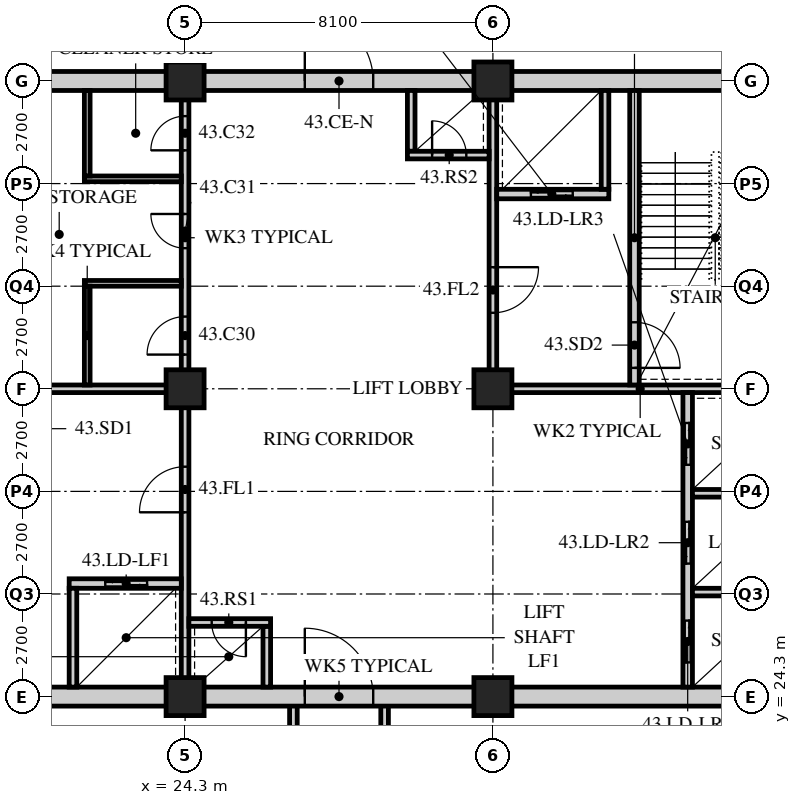
"""IFC4 building model, lengths in metres.
Left out: names, types, materials, properties, quantities, classifications, styles, units other than length and angle.
Written with IfcOpenShell. Run it as: python <this file> out.ifc"""

import sys

from ifc_helpers import new_model, si_unit, direction, frame, frame_2d, origin, origin_2d, place, context, subcontext, project, spatial, rectangle, hollow_rectangle, extrude, element, fill, save


model = new_model("IFC4")
c1 = context("Model", 3, precision=1e-05, world=origin(), true_north=direction((0.0, 1.0)))
c2 = subcontext(c1, "Body", "Model", "MODEL_VIEW")
j1 = project(units=[si_unit("LENGTHUNIT", "METRE"), si_unit("PLANEANGLEUNIT", "RADIAN")], contexts=[c1])
p1 = place(None, origin())
s1 = spatial("IfcSite", under=j1, at=p1, CompositionType="ELEMENT")
p2 = place(p1, origin())
s2 = spatial("IfcBuilding", under=s1, at=p2, CompositionType="ELEMENT")
p3 = place(p2, frame((0.0, 0.0, 170.4)))
s3 = spatial("IfcBuildingStorey", under=s2, at=p3, CompositionType="ELEMENT", Elevation=170.4)
for number, where, z_axis, x_axis in (
    (1, (24.3, 24.3, 0.0), (0.0, 0.0, 1.0), (1.0, 0.0, 0.0)),
    (2, (24.3, 32.4, 0.0), (0.0, 0.0, 1.0), (1.0, 0.0, 0.0)),
    (3, (24.3, 40.5, 0.0), (0.0, 0.0, 1.0), (1.0, 0.0, 0.0)),
    (4, (32.4, 24.3, 0.0), (0.0, 0.0, 1.0), (1.0, 0.0, 0.0)),
    (5, (32.4, 32.4, 0.0), (0.0, 0.0, 1.0), (1.0, 0.0, 0.0)),
    (6, (32.4, 40.5, 0.0), (0.0, 0.0, 1.0), (1.0, 0.0, 0.0)),
):
    element("IfcColumn", number, at=place(p3, frame(where, z_axis=z_axis, x_axis=x_axis)), inside=s3, PredefinedType="COLUMN", context=c2, shape_type="SweptSolid", body=[
        extrude(hollow_rectangle(XDim=1.0, YDim=1.0, WallThickness=0.1, at=origin_2d()), origin(), (0.0, 0.0, 1.0), 3.6),
    ])
for number, where, z_axis, x_axis in (
    (7, (27.15, 20.7, 0.0), (0.0, 0.0, 1.0), (0.0, 1.0, 0.0)),
    (8, (29.55, 20.7, 0.0), (0.0, 0.0, 1.0), (0.0, 1.0, 0.0)),
):
    element("IfcWall", number, at=place(p3, frame(where, z_axis=z_axis, x_axis=x_axis)), inside=s3, PredefinedType="SOLIDWALL", context=c2, shape_type="SweptSolid", body=[
        extrude(rectangle(XDim=3.6, YDim=0.2, at=frame_2d((1.8, 0.0))), origin(), (0.0, 0.0, 1.0), 3.39),
    ])
p4 = place(p3, frame((15.95, 24.3, 0.0), z_axis=(0.0, 0.0, 1.0), x_axis=(1.0, 0.0, 0.0)))
e9 = element("IfcWall", 9, at=p4, inside=s3, PredefinedType="SOLIDWALL", context=c2, shape_type="SweptSolid", body=[
    extrude(rectangle(XDim=24.8, YDim=0.5, at=frame_2d((12.4, 0.0))), origin(), (0.0, 0.0, 1.0), 2.74),
])
p5 = place(p4, frame((11.5, 0.0, 0.0)))
e10 = element("IfcOpeningElement", 10, at=p5, cuts=e9, PredefinedType="OPENING", context=c2, shape_type="SweptSolid", body=[
    extrude(rectangle(XDim=1.8, YDim=2.4, at=frame_2d((0.9, 1.2))), frame((0.0, 0.26, 0.0), z_axis=(0.0, -1.0, 0.0), x_axis=(1.0, 0.0, 0.0)), (0.0, 0.0, 1.0), 0.52),
])
p6 = place(p3, frame((15.95, 40.5, 0.0), z_axis=(0.0, 0.0, 1.0), x_axis=(1.0, 0.0, 0.0)))
e11 = element("IfcWall", 11, at=p6, inside=s3, PredefinedType="SOLIDWALL", context=c2, shape_type="SweptSolid", body=[
    extrude(rectangle(XDim=24.8, YDim=0.5, at=frame_2d((12.4, 0.0))), origin(), (0.0, 0.0, 1.0), 2.74),
])
p7 = place(p6, frame((11.5, 0.0, 0.0)))
e12 = element("IfcOpeningElement", 12, at=p7, cuts=e11, PredefinedType="OPENING", context=c2, shape_type="SweptSolid", body=[
    extrude(rectangle(XDim=1.8, YDim=2.4, at=frame_2d((0.9, 1.2))), frame((0.0, 0.26, 0.0), z_axis=(0.0, -1.0, 0.0), x_axis=(1.0, 0.0, 0.0)), (0.0, 0.0, 1.0), 0.52),
])
p8 = place(p3, frame((16.45, 32.4, 0.0), z_axis=(0.0, 0.0, 1.0), x_axis=(1.0, 0.0, 0.0)))
e13 = element("IfcWall", 13, at=p8, inside=s3, PredefinedType="SOLIDWALL", context=c2, shape_type="SweptSolid", body=[
    extrude(rectangle(XDim=7.95, YDim=0.2, at=frame_2d((3.975, 0.0))), origin(), (0.0, 0.0, 1.0), 2.778),
])
p9 = place(p3, frame((24.3, 24.55, 0.0), z_axis=(0.0, 0.0, 1.0), x_axis=(0.0, 1.0, 0.0)))
e14 = element("IfcWall", 14, at=p9, inside=s3, PredefinedType="SOLIDWALL", context=c2, shape_type="SweptSolid", body=[
    extrude(rectangle(XDim=7.75, YDim=0.2, at=frame_2d((3.875, 0.0))), origin(), (0.0, 0.0, 1.0), 2.778),
])
p10 = place(p9, frame((4.6, 0.0, 0.0)))
e15 = element("IfcOpeningElement", 15, at=p10, cuts=e14, PredefinedType="OPENING", context=c2, shape_type="SweptSolid", body=[
    extrude(rectangle(XDim=1.2, YDim=2.1, at=frame_2d((0.6, 1.05))), frame((0.0, 0.11, 0.0), z_axis=(0.0, -1.0, 0.0), x_axis=(1.0, 0.0, 0.0)), (0.0, 0.0, 1.0), 0.22),
])
p11 = place(p3, frame((21.25, 27.275, 0.0), z_axis=(0.0, 0.0, 1.0), x_axis=(1.0, 0.0, 0.0)))
e16 = element("IfcWall", 16, at=p11, inside=s3, PredefinedType="SOLIDWALL", context=c2, shape_type="SweptSolid", body=[
    extrude(rectangle(XDim=2.95, YDim=0.25, at=frame_2d((1.475, 0.0))), origin(), (0.0, 0.0, 1.0), 3.39),
])
p12 = place(p11, frame((0.95, 0.0, 0.0)))
e17 = element("IfcOpeningElement", 17, at=p12, cuts=e16, PredefinedType="OPENING", context=c2, shape_type="SweptSolid", body=[
    extrude(rectangle(XDim=1.1, YDim=2.4, at=frame_2d((0.55, 1.2))), frame((0.0, 0.135, 0.0), z_axis=(0.0, -1.0, 0.0), x_axis=(1.0, 0.0, 0.0)), (0.0, 0.0, 1.0), 0.27),
])
p13 = place(p3, frame((21.35, 24.55, 0.0), z_axis=(0.0, 0.0, 1.0), x_axis=(0.0, 1.0, 0.0)))
e18 = element("IfcWall", 18, at=p13, inside=s3, PredefinedType="SOLIDWALL", context=c2, shape_type="SweptSolid", body=[
    extrude(rectangle(XDim=2.6, YDim=0.2, at=frame_2d((1.3, 0.0))), origin(), (0.0, 0.0, 1.0), 3.39),
])
p14 = place(p3, frame((26.45, 24.55, 0.0), z_axis=(0.0, 0.0, 1.0), x_axis=(0.0, 1.0, 0.0)))
e19 = element("IfcWall", 19, at=p14, inside=s3, PredefinedType="SOLIDWALL", context=c2, shape_type="SweptSolid", body=[
    extrude(rectangle(XDim=1.6, YDim=0.2, at=frame_2d((0.8, 0.0))), origin(), (0.0, 0.0, 1.0), 3.39),
])
p15 = place(p3, frame((24.4, 26.25, 0.0), z_axis=(0.0, 0.0, 1.0), x_axis=(1.0, 0.0, 0.0)))
e20 = element("IfcWall", 20, at=p15, inside=s3, PredefinedType="SOLIDWALL", context=c2, shape_type="SweptSolid", body=[
    extrude(rectangle(XDim=2.15, YDim=0.2, at=frame_2d((1.075, 0.0))), origin(), (0.0, 0.0, 1.0), 3.39),
])
p16 = place(p15, frame((0.6, 0.0, 0.0)))
e21 = element("IfcOpeningElement", 21, at=p16, cuts=e20, PredefinedType="OPENING", context=c2, shape_type="SweptSolid", body=[
    extrude(rectangle(XDim=0.9, YDim=2.1, at=frame_2d((0.45, 1.05))), frame((0.0, 0.11, 0.0), z_axis=(0.0, -1.0, 0.0), x_axis=(1.0, 0.0, 0.0)), (0.0, 0.0, 1.0), 0.22),
])
p17 = place(p3, frame((32.3, 32.4, 0.0), z_axis=(0.0, 0.0, 1.0), x_axis=(1.0, 0.0, 0.0)))
e22 = element("IfcWall", 22, at=p17, inside=s3, PredefinedType="SOLIDWALL", context=c2, shape_type="SweptSolid", body=[
    extrude(rectangle(XDim=7.95, YDim=0.2, at=frame_2d((3.975, 0.0))), origin(), (0.0, 0.0, 1.0), 2.778),
])
p18 = place(p3, frame((32.4, 32.5, 0.0), z_axis=(0.0, 0.0, 1.0), x_axis=(0.0, 1.0, 0.0)))
e23 = element("IfcWall", 23, at=p18, inside=s3, PredefinedType="SOLIDWALL", context=c2, shape_type="SweptSolid", body=[
    extrude(rectangle(XDim=7.75, YDim=0.2, at=frame_2d((3.875, 0.0))), origin(), (0.0, 0.0, 1.0), 2.778),
])
p19 = place(p18, frame((1.9, 0.0, 0.0)))
e24 = element("IfcOpeningElement", 24, at=p19, cuts=e23, PredefinedType="OPENING", context=c2, shape_type="SweptSolid", body=[
    extrude(rectangle(XDim=1.2, YDim=2.1, at=frame_2d((0.6, 1.05))), frame((0.0, 0.11, 0.0), z_axis=(0.0, -1.0, 0.0), x_axis=(1.0, 0.0, 0.0)), (0.0, 0.0, 1.0), 0.22),
])
p20 = place(p3, frame((37.525, 24.55, 0.0), z_axis=(0.0, 0.0, 1.0), x_axis=(0.0, 1.0, 0.0)))
e25 = element("IfcWall", 25, at=p20, inside=s3, PredefinedType="SOLIDWALL", context=c2, shape_type="SweptSolid", body=[
    extrude(rectangle(XDim=7.75, YDim=0.25, at=frame_2d((3.875, 0.0))), origin(), (0.0, 0.0, 1.0), 3.39),
])
p21 = place(p20, frame((0.65, 0.0, 0.0)))
e26 = element("IfcOpeningElement", 26, at=p21, cuts=e25, PredefinedType="OPENING", context=c2, shape_type="SweptSolid", body=[
    extrude(rectangle(XDim=1.1, YDim=2.4, at=frame_2d((0.55, 1.2))), frame((0.0, 0.135, 0.0), z_axis=(0.0, -1.0, 0.0), x_axis=(1.0, 0.0, 0.0)), (0.0, 0.0, 1.0), 0.27),
])
p22 = place(p20, frame((3.25, 0.0, 0.0)))
e27 = element("IfcOpeningElement", 27, at=p22, cuts=e25, PredefinedType="OPENING", context=c2, shape_type="SweptSolid", body=[
    extrude(rectangle(XDim=1.1, YDim=2.4, at=frame_2d((0.55, 1.2))), frame((0.0, 0.135, 0.0), z_axis=(0.0, -1.0, 0.0), x_axis=(1.0, 0.0, 0.0)), (0.0, 0.0, 1.0), 0.27),
])
p23 = place(p20, frame((5.85, 0.0, 0.0)))
e28 = element("IfcOpeningElement", 28, at=p23, cuts=e25, PredefinedType="OPENING", context=c2, shape_type="SweptSolid", body=[
    extrude(rectangle(XDim=1.1, YDim=2.4, at=frame_2d((0.55, 1.2))), frame((0.0, 0.135, 0.0), z_axis=(0.0, -1.0, 0.0), x_axis=(1.0, 0.0, 0.0)), (0.0, 0.0, 1.0), 0.27),
])
for number, where, z_axis, x_axis in (
    (29, (37.65, 27.05, 0.0), (0.0, 0.0, 1.0), (1.0, 0.0, 0.0)),
    (30, (37.65, 29.65, 0.0), (0.0, 0.0, 1.0), (1.0, 0.0, 0.0)),
):
    element("IfcWall", number, at=place(p3, frame(where, z_axis=z_axis, x_axis=x_axis)), inside=s3, PredefinedType="SOLIDWALL", context=c2, shape_type="SweptSolid", body=[
        extrude(rectangle(XDim=2.6, YDim=0.2, at=frame_2d((1.3, 0.0))), origin(), (0.0, 0.0, 1.0), 3.39),
    ])
p24 = place(p3, frame((36.125, 32.5, 0.0), z_axis=(0.0, 0.0, 1.0), x_axis=(0.0, 1.0, 0.0)))
e31 = element("IfcWall", 31, at=p24, inside=s3, PredefinedType="SOLIDWALL", context=c2, shape_type="SweptSolid", body=[
    extrude(rectangle(XDim=7.75, YDim=0.25, at=frame_2d((3.875, 0.0))), origin(), (0.0, 0.0, 1.0), 3.39),
])
p25 = place(p24, frame((0.45, 0.0, 0.0)))
e32 = element("IfcOpeningElement", 32, at=p25, cuts=e31, PredefinedType="OPENING", context=c2, shape_type="SweptSolid", body=[
    extrude(rectangle(XDim=1.2, YDim=2.1, at=frame_2d((0.6, 1.05))), frame((0.0, 0.135, 0.0), z_axis=(0.0, -1.0, 0.0), x_axis=(1.0, 0.0, 0.0)), (0.0, 0.0, 1.0), 0.27),
])
p26 = place(p3, frame((32.5, 37.525, 0.0), z_axis=(0.0, 0.0, 1.0), x_axis=(1.0, 0.0, 0.0)))
e33 = element("IfcWall", 33, at=p26, inside=s3, PredefinedType="SOLIDWALL", context=c2, shape_type="SweptSolid", body=[
    extrude(rectangle(XDim=2.95, YDim=0.25, at=frame_2d((1.475, 0.0))), origin(), (0.0, 0.0, 1.0), 3.39),
])
p27 = place(p26, frame((0.9, 0.0, 0.0)))
e34 = element("IfcOpeningElement", 34, at=p27, cuts=e33, PredefinedType="OPENING", context=c2, shape_type="SweptSolid", body=[
    extrude(rectangle(XDim=1.1, YDim=2.4, at=frame_2d((0.55, 1.2))), frame((0.0, 0.135, 0.0), z_axis=(0.0, -1.0, 0.0), x_axis=(1.0, 0.0, 0.0)), (0.0, 0.0, 1.0), 0.27),
])
p28 = place(p3, frame((35.35, 37.65, 0.0), z_axis=(0.0, 0.0, 1.0), x_axis=(0.0, 1.0, 0.0)))
e35 = element("IfcWall", 35, at=p28, inside=s3, PredefinedType="SOLIDWALL", context=c2, shape_type="SweptSolid", body=[
    extrude(rectangle(XDim=2.6, YDim=0.2, at=frame_2d((1.3, 0.0))), origin(), (0.0, 0.0, 1.0), 3.39),
])
p29 = place(p3, frame((30.25, 38.65, 0.0), z_axis=(0.0, 0.0, 1.0), x_axis=(0.0, 1.0, 0.0)))
e36 = element("IfcWall", 36, at=p29, inside=s3, PredefinedType="SOLIDWALL", context=c2, shape_type="SweptSolid", body=[
    extrude(rectangle(XDim=1.6, YDim=0.2, at=frame_2d((0.8, 0.0))), origin(), (0.0, 0.0, 1.0), 3.39),
])
p30 = place(p3, frame((30.15, 38.55, 0.0), z_axis=(0.0, 0.0, 1.0), x_axis=(1.0, 0.0, 0.0)))
e37 = element("IfcWall", 37, at=p30, inside=s3, PredefinedType="SOLIDWALL", context=c2, shape_type="SweptSolid", body=[
    extrude(rectangle(XDim=2.15, YDim=0.2, at=frame_2d((1.075, 0.0))), origin(), (0.0, 0.0, 1.0), 3.39),
])
p31 = place(p30, frame((0.65, 0.0, 0.0)))
e38 = element("IfcOpeningElement", 38, at=p31, cuts=e37, PredefinedType="OPENING", context=c2, shape_type="SweptSolid", body=[
    extrude(rectangle(XDim=0.9, YDim=2.1, at=frame_2d((0.45, 1.05))), frame((0.0, 0.11, 0.0), z_axis=(0.0, -1.0, 0.0), x_axis=(1.0, 0.0, 0.0)), (0.0, 0.0, 1.0), 0.22),
])
p32 = place(p3, frame((24.3, 32.5, 0.0), z_axis=(0.0, 0.0, 1.0), x_axis=(0.0, 1.0, 0.0)))
e39 = element("IfcWall", 39, at=p32, inside=s3, PredefinedType="PARTITIONING", context=c2, shape_type="SweptSolid", body=[
    extrude(rectangle(XDim=7.75, YDim=0.2, at=frame_2d((3.875, 0.0))), origin(), (0.0, 0.0, 1.0), 2.778),
])
p33 = place(p32, frame((0.8, 0.0, 0.0)))
e40 = element("IfcOpeningElement", 40, at=p33, cuts=e39, PredefinedType="OPENING", context=c2, shape_type="SweptSolid", body=[
    extrude(rectangle(XDim=1.0, YDim=2.1, at=frame_2d((0.5, 1.05))), frame((0.0, 0.11, 0.0), z_axis=(0.0, -1.0, 0.0), x_axis=(1.0, 0.0, 0.0)), (0.0, 0.0, 1.0), 0.22),
])
p34 = place(p32, frame((3.6, 0.0, 0.0)))
e41 = element("IfcOpeningElement", 41, at=p34, cuts=e39, PredefinedType="OPENING", context=c2, shape_type="SweptSolid", body=[
    extrude(rectangle(XDim=0.9, YDim=2.1, at=frame_2d((0.45, 1.05))), frame((0.0, 0.11, 0.0), z_axis=(0.0, -1.0, 0.0), x_axis=(1.0, 0.0, 0.0)), (0.0, 0.0, 1.0), 0.22),
])
p35 = place(p32, frame((6.175, 0.0, 0.0)))
e42 = element("IfcOpeningElement", 42, at=p35, cuts=e39, PredefinedType="OPENING", context=c2, shape_type="SweptSolid", body=[
    extrude(rectangle(XDim=0.9, YDim=2.1, at=frame_2d((0.45, 1.05))), frame((0.0, 0.11, 0.0), z_axis=(0.0, -1.0, 0.0), x_axis=(1.0, 0.0, 0.0)), (0.0, 0.0, 1.0), 0.22),
])
for number, where, z_axis, x_axis in (
    (43, (21.65, 35.175, 0.0), (0.0, 0.0, 1.0), (1.0, 0.0, 0.0)),
    (44, (21.65, 37.925, 0.0), (0.0, 0.0, 1.0), (1.0, 0.0, 0.0)),
):
    element("IfcWall", number, at=place(p3, frame(where, z_axis=z_axis, x_axis=x_axis)), inside=s3, PredefinedType="PARTITIONING", context=c2, shape_type="SweptSolid", body=[
        extrude(rectangle(XDim=2.55, YDim=0.15, at=frame_2d((1.275, 0.0))), origin(), (0.0, 0.0, 1.0), 3.39),
    ])
p36 = place(p3, frame((21.725, 32.5, 0.0), z_axis=(0.0, 0.0, 1.0), x_axis=(0.0, 1.0, 0.0)))
e45 = element("IfcWall", 45, at=p36, inside=s3, PredefinedType="PARTITIONING", context=c2, shape_type="SweptSolid", body=[
    extrude(rectangle(XDim=2.6, YDim=0.15, at=frame_2d((1.3, 0.0))), origin(), (0.0, 0.0, 1.0), 3.39),
])
p37 = place(p3, frame((21.725, 38.0, 0.0), z_axis=(0.0, 0.0, 1.0), x_axis=(0.0, 1.0, 0.0)))
e46 = element("IfcWall", 46, at=p37, inside=s3, PredefinedType="PARTITIONING", context=c2, shape_type="SweptSolid", body=[
    extrude(rectangle(XDim=2.25, YDim=0.15, at=frame_2d((1.125, 0.0))), origin(), (0.0, 0.0, 1.0), 3.39),
])
p38 = place(p33, origin())
e47 = element("IfcDoor", 47, at=p38, inside=s3, OperationType="SINGLE_SWING_LEFT", PredefinedType="DOOR", context=c2, shape_type="SweptSolid", body=[
    extrude(rectangle(XDim=1.0, YDim=2.1, at=frame_2d((0.5, 1.05))), frame((0.0, 0.025, 0.0), z_axis=(0.0, -1.0, 0.0), x_axis=(1.0, 0.0, 0.0)), (0.0, 0.0, 1.0), 0.05),
])
fill(e40, e47)
p39 = place(p34, origin())
e48 = element("IfcDoor", 48, at=p39, inside=s3, OperationType="SINGLE_SWING_RIGHT", PredefinedType="DOOR", context=c2, shape_type="SweptSolid", body=[
    extrude(rectangle(XDim=0.9, YDim=2.1, at=frame_2d((0.45, 1.05))), frame((0.0, 0.025, 0.0), z_axis=(0.0, -1.0, 0.0), x_axis=(1.0, 0.0, 0.0)), (0.0, 0.0, 1.0), 0.05),
])
fill(e41, e48)
p40 = place(p35, origin())
e49 = element("IfcDoor", 49, at=p40, inside=s3, OperationType="SINGLE_SWING_LEFT", PredefinedType="DOOR", context=c2, shape_type="SweptSolid", body=[
    extrude(rectangle(XDim=0.9, YDim=2.1, at=frame_2d((0.45, 1.05))), frame((0.0, 0.025, 0.0), z_axis=(0.0, -1.0, 0.0), x_axis=(1.0, 0.0, 0.0)), (0.0, 0.0, 1.0), 0.05),
])
fill(e42, e49)
p41 = place(p10, origin())
e50 = element("IfcDoor", 50, at=p41, inside=s3, OperationType="SINGLE_SWING_LEFT", PredefinedType="DOOR", context=c2, shape_type="SweptSolid", body=[
    extrude(rectangle(XDim=1.2, YDim=2.1, at=frame_2d((0.6, 1.05))), frame((0.0, 0.025, 0.0), z_axis=(0.0, -1.0, 0.0), x_axis=(1.0, 0.0, 0.0)), (0.0, 0.0, 1.0), 0.05),
])
fill(e15, e50)
p42 = place(p16, origin())
e51 = element("IfcDoor", 51, at=p42, inside=s3, OperationType="SINGLE_SWING_LEFT", PredefinedType="DOOR", context=c2, shape_type="SweptSolid", body=[
    extrude(rectangle(XDim=0.9, YDim=2.1, at=frame_2d((0.45, 1.05))), frame((0.0, 0.025, 0.0), z_axis=(0.0, -1.0, 0.0), x_axis=(1.0, 0.0, 0.0)), (0.0, 0.0, 1.0), 0.05),
])
fill(e21, e51)
p43 = place(p25, origin())
e52 = element("IfcDoor", 52, at=p43, inside=s3, OperationType="SINGLE_SWING_RIGHT", PredefinedType="DOOR", context=c2, shape_type="SweptSolid", body=[
    extrude(rectangle(XDim=1.2, YDim=2.1, at=frame_2d((0.6, 1.05))), frame((0.0, 0.025, 0.0), z_axis=(0.0, -1.0, 0.0), x_axis=(1.0, 0.0, 0.0)), (0.0, 0.0, 1.0), 0.05),
])
fill(e32, e52)
p44 = place(p19, origin())
e53 = element("IfcDoor", 53, at=p44, inside=s3, OperationType="SINGLE_SWING_LEFT", PredefinedType="DOOR", context=c2, shape_type="SweptSolid", body=[
    extrude(rectangle(XDim=1.2, YDim=2.1, at=frame_2d((0.6, 1.05))), frame((0.0, 0.025, 0.0), z_axis=(0.0, -1.0, 0.0), x_axis=(1.0, 0.0, 0.0)), (0.0, 0.0, 1.0), 0.05),
])
fill(e24, e53)
p45 = place(p31, origin())
e54 = element("IfcDoor", 54, at=p45, inside=s3, OperationType="SINGLE_SWING_LEFT", PredefinedType="DOOR", context=c2, shape_type="SweptSolid", body=[
    extrude(rectangle(XDim=0.9, YDim=2.1, at=frame_2d((0.45, 1.05))), frame((0.0, 0.025, 0.0), z_axis=(0.0, -1.0, 0.0), x_axis=(1.0, 0.0, 0.0)), (0.0, 0.0, 1.0), 0.05),
])
fill(e38, e54)
p46 = place(p21, origin())
e55 = element("IfcDoor", 55, at=p46, inside=s3, OperationType="DOUBLE_DOOR_SLIDING", PredefinedType="DOOR", context=c2, shape_type="SweptSolid", body=[
    extrude(rectangle(XDim=1.1, YDim=2.4, at=frame_2d((0.55, 1.2))), frame((0.0, 0.025, 0.0), z_axis=(0.0, -1.0, 0.0), x_axis=(1.0, 0.0, 0.0)), (0.0, 0.0, 1.0), 0.05),
])
fill(e26, e55)
p47 = place(p22, origin())
e56 = element("IfcDoor", 56, at=p47, inside=s3, OperationType="DOUBLE_DOOR_SLIDING", PredefinedType="DOOR", context=c2, shape_type="SweptSolid", body=[
    extrude(rectangle(XDim=1.1, YDim=2.4, at=frame_2d((0.55, 1.2))), frame((0.0, 0.025, 0.0), z_axis=(0.0, -1.0, 0.0), x_axis=(1.0, 0.0, 0.0)), (0.0, 0.0, 1.0), 0.05),
])
fill(e27, e56)
p48 = place(p23, origin())
e57 = element("IfcDoor", 57, at=p48, inside=s3, OperationType="DOUBLE_DOOR_SLIDING", PredefinedType="DOOR", context=c2, shape_type="SweptSolid", body=[
    extrude(rectangle(XDim=1.1, YDim=2.4, at=frame_2d((0.55, 1.2))), frame((0.0, 0.025, 0.0), z_axis=(0.0, -1.0, 0.0), x_axis=(1.0, 0.0, 0.0)), (0.0, 0.0, 1.0), 0.05),
])
fill(e28, e57)
p49 = place(p12, origin())
e58 = element("IfcDoor", 58, at=p49, inside=s3, OperationType="DOUBLE_DOOR_SLIDING", PredefinedType="DOOR", context=c2, shape_type="SweptSolid", body=[
    extrude(rectangle(XDim=1.1, YDim=2.4, at=frame_2d((0.55, 1.2))), frame((0.0, 0.025, 0.0), z_axis=(0.0, -1.0, 0.0), x_axis=(1.0, 0.0, 0.0)), (0.0, 0.0, 1.0), 0.05),
])
fill(e17, e58)
p50 = place(p27, origin())
e59 = element("IfcDoor", 59, at=p50, inside=s3, OperationType="DOUBLE_DOOR_SLIDING", PredefinedType="DOOR", context=c2, shape_type="SweptSolid", body=[
    extrude(rectangle(XDim=1.1, YDim=2.4, at=frame_2d((0.55, 1.2))), frame((0.0, 0.025, 0.0), z_axis=(0.0, -1.0, 0.0), x_axis=(1.0, 0.0, 0.0)), (0.0, 0.0, 1.0), 0.05),
])
fill(e34, e59)
p51 = place(p5, origin())
e60 = element("IfcDoor", 60, at=p51, inside=s3, OperationType="DOUBLE_DOOR_SINGLE_SWING", PredefinedType="DOOR", context=c2, shape_type="SweptSolid", body=[
    extrude(rectangle(XDim=1.8, YDim=2.4, at=frame_2d((0.9, 1.2))), frame((0.0, 0.025, 0.0), z_axis=(0.0, -1.0, 0.0), x_axis=(1.0, 0.0, 0.0)), (0.0, 0.0, 1.0), 0.05),
])
fill(e10, e60)
p52 = place(p7, origin())
e61 = element("IfcDoor", 61, at=p52, inside=s3, OperationType="DOUBLE_DOOR_SINGLE_SWING", PredefinedType="DOOR", context=c2, shape_type="SweptSolid", body=[
    extrude(rectangle(XDim=1.8, YDim=2.4, at=frame_2d((0.9, 1.2))), frame((0.0, 0.025, 0.0), z_axis=(0.0, -1.0, 0.0), x_axis=(1.0, 0.0, 0.0)), (0.0, 0.0, 1.0), 0.05),
])
fill(e12, e61)
save(model, sys.argv[1])
